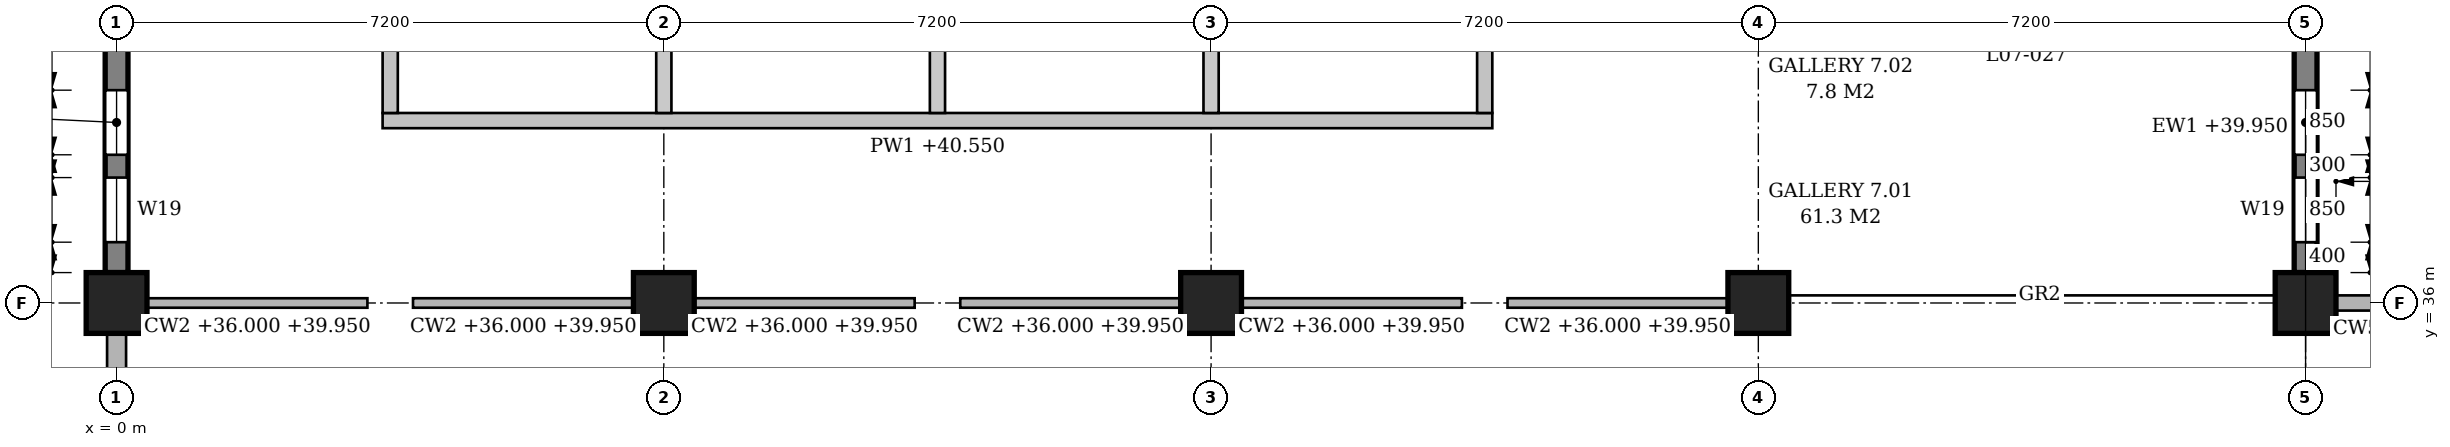
"""IFC4 building model, lengths in metres.
Left out: names, types, materials, properties, quantities, classifications, styles, units other than length and angle.
Written with IfcOpenShell. Run it as: python <this file> out.ifc"""

import sys

from ifc_helpers import new_model, si_unit, direction, frame, frame_2d, origin, origin_2d, place, context, subcontext, project, spatial, polyline, rectangle, outline, extrude, element, fill, save


model = new_model("IFC4")
c1 = context("Model", 3, precision=1e-05, world=origin(), true_north=direction((0.0, 1.0)))
c2 = subcontext(c1, "Body", "Model", "MODEL_VIEW")
j1 = project(units=[si_unit("LENGTHUNIT", "METRE"), si_unit("PLANEANGLEUNIT", "RADIAN")], contexts=[c1])
p1 = place(None, origin())
s1 = spatial("IfcSite", under=j1, at=p1, CompositionType="ELEMENT")
p2 = place(p1, origin())
s2 = spatial("IfcBuilding", under=s1, at=p2, CompositionType="ELEMENT")
p3 = place(p2, frame((0.0, 0.0, 36.0)))
s3 = spatial("IfcBuildingStorey", under=s2, at=p3, CompositionType="ELEMENT", Elevation=36.0)
for number, where, z_axis, x_axis in (
    (1, (0.0, 36.0, 0.0), (0.0, 0.0, 1.0), (1.0, 0.0, 0.0)),
    (2, (7.2, 36.0, 0.0), (0.0, 0.0, 1.0), (1.0, 0.0, 0.0)),
    (3, (14.4, 36.0, 0.0), (0.0, 0.0, 1.0), (1.0, 0.0, 0.0)),
    (4, (21.6, 36.0, 0.0), (0.0, 0.0, 1.0), (1.0, 0.0, 0.0)),
    (5, (28.8, 36.0, 0.0), (0.0, 0.0, 1.0), (1.0, 0.0, 0.0)),
):
    element("IfcColumn", number, at=place(p3, frame(where, z_axis=z_axis, x_axis=x_axis)), inside=s3, PredefinedType="COLUMN", context=c2, shape_type="SweptSolid", body=[
        extrude(rectangle(XDim=0.8, YDim=0.8, at=origin_2d()), origin(), (0.0, 0.0, 1.0), 4.8),
    ])
p4 = place(p3, frame((0.0, 36.4, 0.0), z_axis=(0.0, 0.0, 1.0), x_axis=(0.0, 1.0, 0.0)))
e6 = element("IfcWall", 6, at=p4, inside=s3, PredefinedType="STANDARD", context=c2, shape_type="SweptSolid", body=[
    extrude(rectangle(XDim=6.4, YDim=0.3, at=frame_2d((3.2, 0.0))), origin(), (0.0, 0.0, 1.0), 3.95),
])
p5 = place(p4, frame((0.4, 0.0, 0.9)))
e7 = element("IfcOpeningElement", 7, at=p5, cuts=e6, PredefinedType="OPENING", context=c2, shape_type="SweptSolid", body=[
    extrude(outline(polyline([(0.0, 0.0), (0.85, 0.0), (0.85, 2.55), (0.425, 3.0), (0.0, 2.55), (0.0, 0.0)])), frame((0.0, 0.16, 0.0), z_axis=(0.0, -1.0, 0.0), x_axis=(1.0, 0.0, 0.0)), (0.0, 0.0, 1.0), 0.32),
])
p6 = place(p4, frame((1.55, 0.0, 0.9)))
e8 = element("IfcOpeningElement", 8, at=p6, cuts=e6, PredefinedType="OPENING", context=c2, shape_type="SweptSolid", body=[
    extrude(outline(polyline([(0.0, 0.0), (0.85, 0.0), (0.85, 2.55), (0.425, 3.0), (0.0, 2.55), (0.0, 0.0)])), frame((0.0, 0.16, 0.0), z_axis=(0.0, -1.0, 0.0), x_axis=(1.0, 0.0, 0.0)), (0.0, 0.0, 1.0), 0.32),
])
p7 = place(p4, frame((4.0, 0.0, 0.9)))
e9 = element("IfcOpeningElement", 9, at=p7, cuts=e6, PredefinedType="OPENING", context=c2, shape_type="SweptSolid", body=[
    extrude(outline(polyline([(0.0, 0.0), (0.85, 0.0), (0.85, 2.55), (0.425, 3.0), (0.0, 2.55), (0.0, 0.0)])), frame((0.0, 0.16, 0.0), z_axis=(0.0, -1.0, 0.0), x_axis=(1.0, 0.0, 0.0)), (0.0, 0.0, 1.0), 0.32),
])
p8 = place(p4, frame((5.15, 0.0, 0.9)))
e10 = element("IfcOpeningElement", 10, at=p8, cuts=e6, PredefinedType="OPENING", context=c2, shape_type="SweptSolid", body=[
    extrude(outline(polyline([(0.0, 0.0), (0.85, 0.0), (0.85, 2.55), (0.425, 3.0), (0.0, 2.55), (0.0, 0.0)])), frame((0.0, 0.16, 0.0), z_axis=(0.0, -1.0, 0.0), x_axis=(1.0, 0.0, 0.0)), (0.0, 0.0, 1.0), 0.32),
])
p9 = place(p3, frame((28.8, 36.4, 0.0), z_axis=(0.0, 0.0, 1.0), x_axis=(0.0, 1.0, 0.0)))
e11 = element("IfcWall", 11, at=p9, inside=s3, PredefinedType="STANDARD", context=c2, shape_type="SweptSolid", body=[
    extrude(rectangle(XDim=6.4, YDim=0.3, at=frame_2d((3.2, 0.0))), origin(), (0.0, 0.0, 1.0), 3.95),
])
p10 = place(p9, frame((0.4, 0.0, 0.9)))
e12 = element("IfcOpeningElement", 12, at=p10, cuts=e11, PredefinedType="OPENING", context=c2, shape_type="SweptSolid", body=[
    extrude(outline(polyline([(0.0, 0.0), (0.85, 0.0), (0.85, 2.55), (0.425, 3.0), (0.0, 2.55), (0.0, 0.0)])), frame((0.0, 0.16, 0.0), z_axis=(0.0, -1.0, 0.0), x_axis=(1.0, 0.0, 0.0)), (0.0, 0.0, 1.0), 0.32),
])
p11 = place(p9, frame((1.55, 0.0, 0.9)))
e13 = element("IfcOpeningElement", 13, at=p11, cuts=e11, PredefinedType="OPENING", context=c2, shape_type="SweptSolid", body=[
    extrude(outline(polyline([(0.0, 0.0), (0.85, 0.0), (0.85, 2.55), (0.425, 3.0), (0.0, 2.55), (0.0, 0.0)])), frame((0.0, 0.16, 0.0), z_axis=(0.0, -1.0, 0.0), x_axis=(1.0, 0.0, 0.0)), (0.0, 0.0, 1.0), 0.32),
])
p12 = place(p9, frame((4.0, 0.0, 0.9)))
e14 = element("IfcOpeningElement", 14, at=p12, cuts=e11, PredefinedType="OPENING", context=c2, shape_type="SweptSolid", body=[
    extrude(outline(polyline([(0.0, 0.0), (0.85, 0.0), (0.85, 2.55), (0.425, 3.0), (0.0, 2.55), (0.0, 0.0)])), frame((0.0, 0.16, 0.0), z_axis=(0.0, -1.0, 0.0), x_axis=(1.0, 0.0, 0.0)), (0.0, 0.0, 1.0), 0.32),
])
p13 = place(p9, frame((5.15, 0.0, 0.9)))
e15 = element("IfcOpeningElement", 15, at=p13, cuts=e11, PredefinedType="OPENING", context=c2, shape_type="SweptSolid", body=[
    extrude(outline(polyline([(0.0, 0.0), (0.85, 0.0), (0.85, 2.55), (0.425, 3.0), (0.0, 2.55), (0.0, 0.0)])), frame((0.0, 0.16, 0.0), z_axis=(0.0, -1.0, 0.0), x_axis=(1.0, 0.0, 0.0)), (0.0, 0.0, 1.0), 0.32),
])
p14 = place(p3, frame((0.0, 22.0, 4.8), z_axis=(0.0, 0.0, 1.0), x_axis=(0.0, 1.0, 0.0)))
e16 = element("IfcWall", 16, at=p14, inside=s3, PredefinedType="POLYGONAL", context=c2, shape_type="SweptSolid", body=[
    extrude(outline(polyline([(0.0, 0.0), (13.6, 0.0), (13.6, 0.4), (6.8, 7.2), (0.0, 0.4), (0.0, 0.0)])), frame((0.0, 0.15, 0.0), z_axis=(0.0, -1.0, 0.0), x_axis=(1.0, 0.0, 0.0)), (0.0, 0.0, 1.0), 0.3),
])
p15 = place(p14, frame((6.05, 0.0, 3.5)))
e17 = element("IfcOpeningElement", 17, at=p15, cuts=e16, PredefinedType="OPENING", context=c2, shape_type="SweptSolid", body=[
    extrude(outline(polyline([(0.0, 0.0), (1.5, 0.0), (1.5, 1.95), (0.75, 2.7), (0.0, 1.95), (0.0, 0.0)])), frame((0.0, 0.16, 0.0), z_axis=(0.0, -1.0, 0.0), x_axis=(1.0, 0.0, 0.0)), (0.0, 0.0, 1.0), 0.32),
])
p16 = place(p14, frame((2.6, 0.0, 0.8)))
e18 = element("IfcOpeningElement", 18, at=p16, cuts=e16, PredefinedType="OPENING", context=c2, shape_type="SweptSolid", body=[
    extrude(outline(polyline([(0.0, 0.0), (1.2, 0.0), (1.2, 1.65), (0.6, 2.25), (0.0, 1.65), (0.0, 0.0)])), frame((0.0, 0.16, 0.0), z_axis=(0.0, -1.0, 0.0), x_axis=(1.0, 0.0, 0.0)), (0.0, 0.0, 1.0), 0.32),
])
p17 = place(p14, frame((9.8, 0.0, 0.8)))
e19 = element("IfcOpeningElement", 19, at=p17, cuts=e16, PredefinedType="OPENING", context=c2, shape_type="SweptSolid", body=[
    extrude(outline(polyline([(0.0, 0.0), (1.2, 0.0), (1.2, 1.65), (0.6, 2.25), (0.0, 1.65), (0.0, 0.0)])), frame((0.0, 0.16, 0.0), z_axis=(0.0, -1.0, 0.0), x_axis=(1.0, 0.0, 0.0)), (0.0, 0.0, 1.0), 0.32),
])
p18 = place(p3, frame((3.5, 38.4, 0.0), z_axis=(0.0, 0.0, 1.0), x_axis=(1.0, 0.0, 0.0)))
e20 = element("IfcWall", 20, at=p18, inside=s3, PredefinedType="PARTITIONING", context=c2, shape_type="SweptSolid", body=[
    extrude(outline(polyline([(0.0, 0.0), (14.6, 0.0), (14.6, 4.55), (11.125, 4.55), (11.125, 3.85), (10.675, 3.85), (10.675, 4.55), (3.925, 4.55), (3.925, 3.85), (3.475, 3.85), (3.475, 4.55), (0.0, 4.55), (0.0, 0.0)])), frame((0.0, 0.1, 0.0), z_axis=(0.0, -1.0, 0.0), x_axis=(1.0, 0.0, 0.0)), (0.0, 0.0, 1.0), 0.2),
])
p19 = place(p3, frame((3.6, 38.5, 0.0), z_axis=(0.0, 0.0, 1.0), x_axis=(0.0, 1.0, 0.0)))
e21 = element("IfcWall", 21, at=p19, inside=s3, PredefinedType="PARTITIONING", context=c2, shape_type="SweptSolid", body=[
    extrude(outline(polyline([(0.0, 0.0), (9.4, 0.0), (9.4, 4.55), (4.925, 4.55), (4.925, 3.85), (4.475, 3.85), (4.475, 4.55), (0.0, 4.55), (0.0, 0.0)])), frame((0.0, 0.1, 0.0), z_axis=(0.0, -1.0, 0.0), x_axis=(1.0, 0.0, 0.0)), (0.0, 0.0, 1.0), 0.2),
])
p20 = place(p19, frame((4.2, 0.0, 0.0)))
e22 = element("IfcOpeningElement", 22, at=p20, cuts=e21, PredefinedType="OPENING", context=c2, shape_type="SweptSolid", body=[
    extrude(rectangle(XDim=1.0, YDim=2.1, at=frame_2d((0.5, 1.05))), frame((0.0, 0.11, 0.0), z_axis=(0.0, -1.0, 0.0), x_axis=(1.0, 0.0, 0.0)), (0.0, 0.0, 1.0), 0.22),
])
p21 = place(p3, frame((7.2, 38.5, 0.0), z_axis=(0.0, 0.0, 1.0), x_axis=(0.0, 1.0, 0.0)))
e23 = element("IfcWall", 23, at=p21, inside=s3, PredefinedType="PARTITIONING", context=c2, shape_type="SweptSolid", body=[
    extrude(rectangle(XDim=4.3, YDim=0.2, at=frame_2d((2.15, 0.0))), origin(), (0.0, 0.0, 1.0), 3.85),
])
p22 = place(p3, frame((10.8, 38.5, 0.0), z_axis=(0.0, 0.0, 1.0), x_axis=(0.0, 1.0, 0.0)))
e24 = element("IfcWall", 24, at=p22, inside=s3, PredefinedType="PARTITIONING", context=c2, shape_type="SweptSolid", body=[
    extrude(outline(polyline([(0.0, 0.0), (9.4, 0.0), (9.4, 4.55), (4.925, 4.55), (4.925, 3.85), (4.475, 3.85), (4.475, 4.55), (0.0, 4.55), (0.0, 0.0)])), frame((0.0, 0.1, 0.0), z_axis=(0.0, -1.0, 0.0), x_axis=(1.0, 0.0, 0.0)), (0.0, 0.0, 1.0), 0.2),
])
p23 = place(p3, frame((14.4, 38.5, 0.0), z_axis=(0.0, 0.0, 1.0), x_axis=(0.0, 1.0, 0.0)))
e25 = element("IfcWall", 25, at=p23, inside=s3, PredefinedType="PARTITIONING", context=c2, shape_type="SweptSolid", body=[
    extrude(rectangle(XDim=4.3, YDim=0.2, at=frame_2d((2.15, 0.0))), origin(), (0.0, 0.0, 1.0), 3.85),
])
p24 = place(p23, frame((1.65, 0.0, 0.0)))
e26 = element("IfcOpeningElement", 26, at=p24, cuts=e25, PredefinedType="OPENING", context=c2, shape_type="SweptSolid", body=[
    extrude(rectangle(XDim=1.0, YDim=2.1, at=frame_2d((0.5, 1.05))), frame((0.0, 0.11, 0.0), z_axis=(0.0, -1.0, 0.0), x_axis=(1.0, 0.0, 0.0)), (0.0, 0.0, 1.0), 0.22),
])
p25 = place(p3, frame((18.0, 38.5, 0.0), z_axis=(0.0, 0.0, 1.0), x_axis=(0.0, 1.0, 0.0)))
e27 = element("IfcWall", 27, at=p25, inside=s3, PredefinedType="PARTITIONING", context=c2, shape_type="SweptSolid", body=[
    extrude(outline(polyline([(0.0, 0.0), (9.4, 0.0), (9.4, 4.55), (4.925, 4.55), (4.925, 3.85), (4.475, 3.85), (4.475, 4.55), (0.0, 4.55), (0.0, 0.0)])), frame((0.0, 0.1, 0.0), z_axis=(0.0, -1.0, 0.0), x_axis=(1.0, 0.0, 0.0)), (0.0, 0.0, 1.0), 0.2),
])
p26 = place(p10, origin())
e28 = element("IfcWindow", 28, at=p26, inside=s3, PartitioningType="SINGLE_PANEL", PredefinedType="WINDOW", context=c2, shape_type="SweptSolid", body=[
    extrude(outline(polyline([(0.0, 0.0), (0.85, 0.0), (0.85, 2.55), (0.425, 3.0), (0.0, 2.55), (0.0, 0.0)])), frame((0.0, 0.03, 0.0), z_axis=(0.0, -1.0, 0.0), x_axis=(1.0, 0.0, 0.0)), (0.0, 0.0, 1.0), 0.06),
])
fill(e12, e28)
p27 = place(p11, origin())
e29 = element("IfcWindow", 29, at=p27, inside=s3, PartitioningType="SINGLE_PANEL", PredefinedType="WINDOW", context=c2, shape_type="SweptSolid", body=[
    extrude(outline(polyline([(0.0, 0.0), (0.85, 0.0), (0.85, 2.55), (0.425, 3.0), (0.0, 2.55), (0.0, 0.0)])), frame((0.0, 0.03, 0.0), z_axis=(0.0, -1.0, 0.0), x_axis=(1.0, 0.0, 0.0)), (0.0, 0.0, 1.0), 0.06),
])
fill(e13, e29)
p28 = place(p5, origin())
e30 = element("IfcWindow", 30, at=p28, inside=s3, PartitioningType="SINGLE_PANEL", PredefinedType="WINDOW", context=c2, shape_type="SweptSolid", body=[
    extrude(outline(polyline([(0.0, 0.0), (0.85, 0.0), (0.85, 2.55), (0.425, 3.0), (0.0, 2.55), (0.0, 0.0)])), frame((0.0, 0.03, 0.0), z_axis=(0.0, -1.0, 0.0), x_axis=(1.0, 0.0, 0.0)), (0.0, 0.0, 1.0), 0.06),
])
fill(e7, e30)
p29 = place(p6, origin())
e31 = element("IfcWindow", 31, at=p29, inside=s3, PartitioningType="SINGLE_PANEL", PredefinedType="WINDOW", context=c2, shape_type="SweptSolid", body=[
    extrude(outline(polyline([(0.0, 0.0), (0.85, 0.0), (0.85, 2.55), (0.425, 3.0), (0.0, 2.55), (0.0, 0.0)])), frame((0.0, 0.03, 0.0), z_axis=(0.0, -1.0, 0.0), x_axis=(1.0, 0.0, 0.0)), (0.0, 0.0, 1.0), 0.06),
])
fill(e8, e31)
save(model, sys.argv[1])
